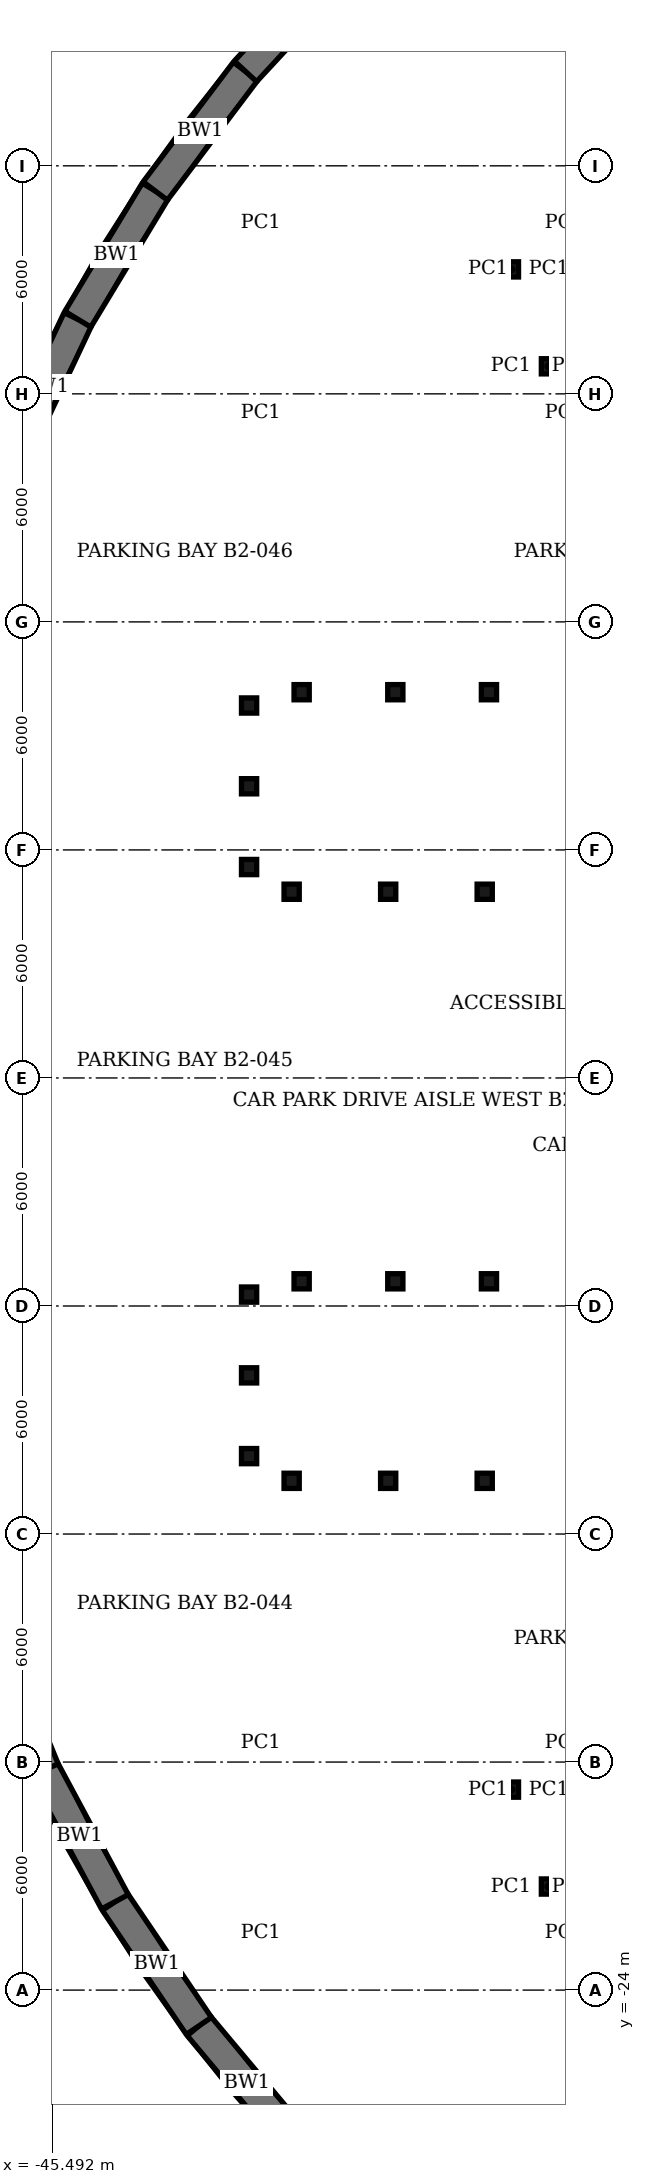
"""IFC4 building model, lengths in metres.
Left out: names, types, materials, properties, quantities, classifications, styles, units other than length and angle.
Written with IfcOpenShell. Run it as: python <this file> out.ifc"""

import sys

from ifc_helpers import new_model, si_unit, direction, frame, frame_2d, origin, origin_2d, place, context, subcontext, project, spatial, rectangle, extrude, element, save


model = new_model("IFC4")
c1 = context("Model", 3, precision=1e-05, world=origin(), true_north=direction((0.0, 1.0)))
c2 = subcontext(c1, "Body", "Model", "MODEL_VIEW")
j1 = project(units=[si_unit("LENGTHUNIT", "METRE"), si_unit("PLANEANGLEUNIT", "RADIAN")], contexts=[c1])
p1 = place(None, origin())
s1 = spatial("IfcSite", under=j1, at=p1, CompositionType="ELEMENT")
p2 = place(p1, origin())
s2 = spatial("IfcBuilding", under=s1, at=p2, CompositionType="ELEMENT")
p3 = place(p2, frame((0.0, 0.0, -10.5)))
s3 = spatial("IfcBuildingStorey", under=s2, at=p3, CompositionType="ELEMENT", Elevation=-10.5)
p4 = place(p3, frame((-39.101, -27.966, 0.0), z_axis=(0.0, 0.0, 1.0), x_axis=(-0.641663169407, 0.766986555962, 0.0)))
e1 = element("IfcWall", 1, at=p4, inside=s3, PredefinedType="SOLIDWALL", context=c2, shape_type="SweptSolid", body=[
    extrude(rectangle(XDim=3.943, YDim=0.8, at=frame_2d((1.971, 0.0))), origin(), (0.0, 0.0, 1.0), 4.5),
])
p5 = place(p3, frame((-41.631, -24.942, 0.0), z_axis=(0.0, 0.0, 1.0), x_axis=(-0.560375599992, 0.828238605073, 0.0)))
e2 = element("IfcWall", 2, at=p5, inside=s3, PredefinedType="SOLIDWALL", context=c2, shape_type="SweptSolid", body=[
    extrude(rectangle(XDim=3.942, YDim=0.8, at=frame_2d((1.971, 0.0))), origin(), (0.0, 0.0, 1.0), 4.5),
])
p6 = place(p3, frame((-43.84, -21.677, 0.0), z_axis=(0.0, 0.0, 1.0), x_axis=(-0.472252344844, 0.88146339844, 0.0)))
e3 = element("IfcWall", 3, at=p6, inside=s3, PredefinedType="SOLIDWALL", context=c2, shape_type="SweptSolid", body=[
    extrude(rectangle(XDim=3.942, YDim=0.8, at=frame_2d((1.971, 0.0))), origin(), (0.0, 0.0, 1.0), 4.5),
])
p7 = place(p3, frame((-45.702, -18.202, 0.0), z_axis=(0.0, 0.0, 1.0), x_axis=(-0.378936605843, 0.925422632505, 0.0)))
e4 = element("IfcWall", 4, at=p7, inside=s3, PredefinedType="SOLIDWALL", context=c2, shape_type="SweptSolid", body=[
    extrude(rectangle(XDim=3.943, YDim=0.8, at=frame_2d((1.971, 0.0))), origin(), (0.0, 0.0, 1.0), 4.5),
])
p8 = place(p3, frame((-46.495, 16.397, 0.0), z_axis=(0.0, 0.0, 1.0), x_axis=(0.425910354888, 0.904765367153, 0.0)))
e5 = element("IfcWall", 5, at=p8, inside=s3, PredefinedType="SOLIDWALL", context=c2, shape_type="SweptSolid", body=[
    extrude(rectangle(XDim=3.943, YDim=0.8, at=frame_2d((1.971, 0.0))), origin(), (0.0, 0.0, 1.0), 4.5),
])
p9 = place(p3, frame((-44.816, 19.964, 0.0), z_axis=(0.0, 0.0, 1.0), x_axis=(0.517025826806, 0.855969797607, 0.0)))
e6 = element("IfcWall", 6, at=p9, inside=s3, PredefinedType="SOLIDWALL", context=c2, shape_type="SweptSolid", body=[
    extrude(rectangle(XDim=3.941, YDim=0.8, at=frame_2d((1.971, 0.0))), origin(), (0.0, 0.0, 1.0), 4.5),
])
p10 = place(p3, frame((-42.778, 23.338, 0.0), z_axis=(0.0, 0.0, 1.0), x_axis=(0.601930372291, 0.798548575175, 0.0)))
e7 = element("IfcWall", 7, at=p10, inside=s3, PredefinedType="SOLIDWALL", context=c2, shape_type="SweptSolid", body=[
    extrude(rectangle(XDim=3.942, YDim=0.8, at=frame_2d((1.971, 0.0))), origin(), (0.0, 0.0, 1.0), 4.5),
])
p11 = place(p3, frame((-40.405, 26.486, 0.0), z_axis=(0.0, 0.0, 1.0), x_axis=(0.679341363133, 0.733822398361, 0.0)))
e8 = element("IfcWall", 8, at=p11, inside=s3, PredefinedType="SOLIDWALL", context=c2, shape_type="SweptSolid", body=[
    extrude(rectangle(XDim=3.943, YDim=0.8, at=frame_2d((1.972, 0.0))), origin(), (0.0, 0.0, 1.0), 4.5),
])
for number, where, z_axis, x_axis in (
    (9, (-40.0, 17.5, 0.0), (0.0, 0.0, 1.0), (1.0, 0.0, 0.0)),
    (10, (-32.0, 17.5, 0.0), (0.0, 0.0, 1.0), (1.0, 0.0, 0.0)),
    (11, (-32.0, 22.5, 0.0), (0.0, 0.0, 1.0), (1.0, 0.0, 0.0)),
    (12, (-40.0, 22.5, 0.0), (0.0, 0.0, 1.0), (1.0, 0.0, 0.0)),
    (13, (-33.42, 18.725, 0.0), (0.0, 0.0, 1.0), (1.0, 0.0, 0.0)),
    (14, (-32.42, 18.725, 0.0), (0.0, 0.0, 1.0), (1.0, 0.0, 0.0)),
    (15, (-32.42, 21.275, 0.0), (0.0, 0.0, 1.0), (1.0, 0.0, 0.0)),
    (16, (-33.42, 21.275, 0.0), (0.0, 0.0, 1.0), (1.0, 0.0, 0.0)),
    (17, (-40.0, -22.5, 0.0), (0.0, 0.0, 1.0), (1.0, 0.0, 0.0)),
    (18, (-32.0, -22.5, 0.0), (0.0, 0.0, 1.0), (1.0, 0.0, 0.0)),
    (19, (-32.0, -17.5, 0.0), (0.0, 0.0, 1.0), (1.0, 0.0, 0.0)),
    (20, (-40.0, -17.5, 0.0), (0.0, 0.0, 1.0), (1.0, 0.0, 0.0)),
    (21, (-33.42, -21.275, 0.0), (0.0, 0.0, 1.0), (1.0, 0.0, 0.0)),
    (22, (-32.42, -21.275, 0.0), (0.0, 0.0, 1.0), (1.0, 0.0, 0.0)),
    (23, (-32.42, -18.725, 0.0), (0.0, 0.0, 1.0), (1.0, 0.0, 0.0)),
    (24, (-33.42, -18.725, 0.0), (0.0, 0.0, 1.0), (1.0, 0.0, 0.0)),
    (25, (-34.11, 4.9, 0.0), (0.0, 0.0, 1.0), (1.0, 0.0, 0.0)),
    (26, (-36.65, 4.9, 0.0), (0.0, 0.0, 1.0), (1.0, 0.0, 0.0)),
    (27, (-39.19, 4.9, 0.0), (0.0, 0.0, 1.0), (1.0, 0.0, 0.0)),
    (28, (-40.31, 5.55, 0.0), (0.0, 0.0, 1.0), (1.0, 0.0, 0.0)),
    (29, (-40.31, 9.8, 0.0), (0.0, 0.0, 1.0), (1.0, 0.0, 0.0)),
    (30, (-40.31, 7.675, 0.0), (0.0, 0.0, 1.0), (1.0, 0.0, 0.0)),
    (31, (-38.927, 10.15, 0.0), (0.0, 0.0, 1.0), (1.0, 0.0, 0.0)),
    (32, (-36.462, 10.15, 0.0), (0.0, 0.0, 1.0), (1.0, 0.0, 0.0)),
    (33, (-33.998, 10.15, 0.0), (0.0, 0.0, 1.0), (1.0, 0.0, 0.0)),
    (34, (-34.11, -10.6, 0.0), (0.0, 0.0, 1.0), (1.0, 0.0, 0.0)),
    (35, (-36.65, -10.6, 0.0), (0.0, 0.0, 1.0), (1.0, 0.0, 0.0)),
    (36, (-39.19, -10.6, 0.0), (0.0, 0.0, 1.0), (1.0, 0.0, 0.0)),
    (37, (-40.31, -9.95, 0.0), (0.0, 0.0, 1.0), (1.0, 0.0, 0.0)),
    (38, (-40.31, -5.7, 0.0), (0.0, 0.0, 1.0), (1.0, 0.0, 0.0)),
    (39, (-40.31, -7.825, 0.0), (0.0, 0.0, 1.0), (1.0, 0.0, 0.0)),
    (40, (-38.927, -5.35, 0.0), (0.0, 0.0, 1.0), (1.0, 0.0, 0.0)),
    (41, (-36.462, -5.35, 0.0), (0.0, 0.0, 1.0), (1.0, 0.0, 0.0)),
    (42, (-33.998, -5.35, 0.0), (0.0, 0.0, 1.0), (1.0, 0.0, 0.0)),
):
    element("IfcColumn", number, at=place(p3, frame(where, z_axis=z_axis, x_axis=x_axis)), inside=s3, PredefinedType="COLUMN", context=c2, shape_type="SweptSolid", body=[
        extrude(rectangle(XDim=0.4, YDim=0.4, at=origin_2d()), origin(), (0.0, 0.0, 1.0), 4.5),
    ])
save(model, sys.argv[1])
